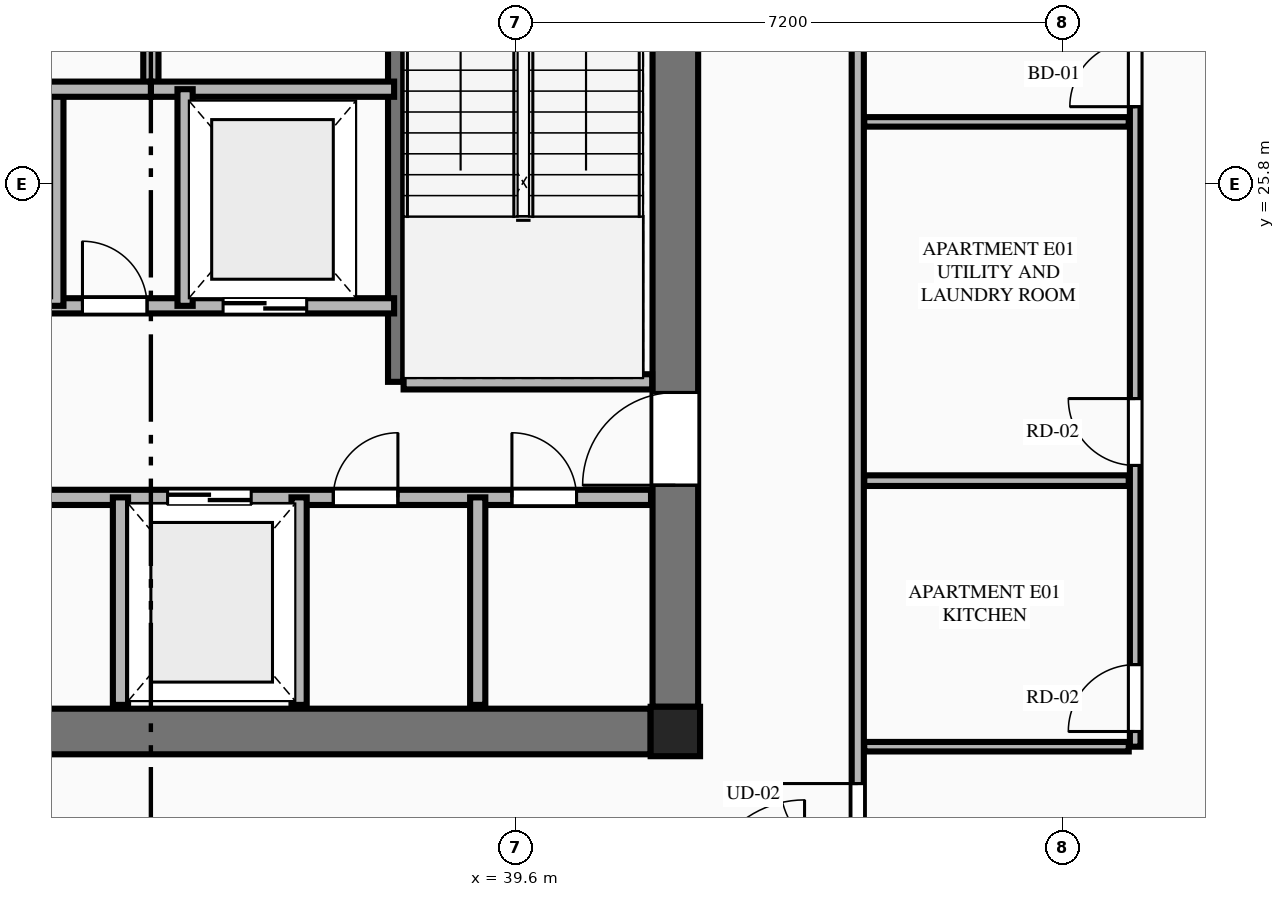
"""IFC4 building model, lengths in metres.
Left out: names, types, materials, properties, quantities, classifications, styles, units other than length and angle.
Written with IfcOpenShell. Run it as: python <this file> out.ifc"""

import sys

from ifc_helpers import new_model, si_unit, direction, frame, frame_2d, origin, origin_2d, place, context, subcontext, project, spatial, rectangle, extrude, element, fill, save


model = new_model("IFC4")
c1 = context("Model", 3, precision=1e-05, world=origin(), true_north=direction((0.0, 1.0)))
c2 = subcontext(c1, "Body", "Model", "MODEL_VIEW")
j1 = project(units=[si_unit("LENGTHUNIT", "METRE"), si_unit("PLANEANGLEUNIT", "RADIAN")], contexts=[c1])
p1 = place(None, origin())
s1 = spatial("IfcSite", under=j1, at=p1, CompositionType="ELEMENT")
p2 = place(p1, origin())
s2 = spatial("IfcBuilding", under=s1, at=p2, CompositionType="ELEMENT")
p3 = place(p2, frame((0.0, 0.0, 167.7)))
s3 = spatial("IfcBuildingStorey", under=s2, at=p3, CompositionType="ELEMENT", Elevation=167.7)
p4 = place(p3, frame((41.7, 18.6, 0.0), z_axis=(0.0, 0.0, 1.0), x_axis=(1.0, 0.0, 0.0)))
e1 = element("IfcColumn", 1, at=p4, inside=s3, PredefinedType="COLUMN", context=c2, shape_type="SweptSolid", body=[
    extrude(rectangle(XDim=0.65, YDim=0.65, at=origin_2d()), origin(), (0.0, 0.0, 1.0), 4.2),
])
p5 = place(p3, frame((23.425, 18.6, 0.0), z_axis=(0.0, 0.0, 1.0), x_axis=(1.0, 0.0, 0.0)))
e2 = element("IfcWall", 2, at=p5, inside=s3, PredefinedType="SHEAR", context=c2, shape_type="SweptSolid", body=[
    extrude(rectangle(XDim=17.95, YDim=0.6, at=frame_2d((8.975, 0.0))), origin(), (0.0, 0.0, 1.0), 4.0),
])
p6 = place(p3, frame((41.7, 18.925, 0.0), z_axis=(0.0, 0.0, 1.0), x_axis=(0.0, 1.0, 0.0)))
e3 = element("IfcWall", 3, at=p6, inside=s3, PredefinedType="SHEAR", context=c2, shape_type="SweptSolid", body=[
    extrude(rectangle(XDim=13.95, YDim=0.6, at=frame_2d((6.975, 0.0))), origin(), (0.0, 0.0, 1.0), 4.0),
])
p7 = place(p6, frame((2.915, 0.0, 0.0)))
e4 = element("IfcOpeningElement", 4, at=p7, cuts=e3, PredefinedType="OPENING", context=c2, shape_type="SweptSolid", body=[
    extrude(rectangle(XDim=1.22, YDim=2.25, at=frame_2d((0.61, 1.125))), frame((0.0, 0.31, 0.0), z_axis=(0.0, -1.0, 0.0), x_axis=(1.0, 0.0, 0.0)), (0.0, 0.0, 1.0), 0.62),
])
p8 = place(p3, frame((38.02, 23.2, 0.0), z_axis=(0.0, 0.0, 1.0), x_axis=(0.0, 1.0, 0.0)))
e5 = element("IfcWall", 5, at=p8, inside=s3, PredefinedType="SHEAR", context=c2, shape_type="SweptSolid", body=[
    extrude(rectangle(XDim=6.78, YDim=0.2, at=frame_2d((3.39, 0.0))), origin(), (0.0, 0.0, 1.0), 4.2),
])
p9 = place(p8, frame((5.32, 0.0, 0.0)))
e6 = element("IfcOpeningElement", 6, at=p9, cuts=e5, PredefinedType="OPENING", context=c2, shape_type="SweptSolid", body=[
    extrude(rectangle(XDim=1.05, YDim=2.15, at=frame_2d((0.525, 1.075))), frame((0.0, 0.11, 0.0), z_axis=(0.0, -1.0, 0.0), x_axis=(1.0, 0.0, 0.0)), (0.0, 0.0, 1.0), 0.22),
])
p10 = place(p3, frame((38.125, 23.2, 0.0), z_axis=(0.0, 0.0, 1.0), x_axis=(1.0, 0.0, 0.0)))
e7 = element("IfcWall", 7, at=p10, inside=s3, PredefinedType="PLUMBINGWALL", context=c2, shape_type="SweptSolid", body=[
    extrude(rectangle(XDim=3.27, YDim=0.2, at=frame_2d((1.635, 0.0))), origin(), (0.0, 0.0, 1.0), 4.0),
])
p11 = place(p3, frame((34.8, 27.05, 0.0), z_axis=(0.0, 0.0, 1.0), x_axis=(0.0, 1.0, 0.0)))
e8 = element("IfcWall", 8, at=p11, inside=s3, PredefinedType="PLUMBINGWALL", context=c2, shape_type="SweptSolid", body=[
    extrude(rectangle(XDim=2.75, YDim=0.2, at=frame_2d((1.375, 0.0))), origin(), (0.0, 0.0, 1.0), 4.0),
])
p12 = place(p11, frame((0.85, 0.0, 0.0)))
e9 = element("IfcOpeningElement", 9, at=p12, cuts=e8, PredefinedType="OPENING", context=c2, shape_type="SweptSolid", body=[
    extrude(rectangle(XDim=1.0, YDim=2.15, at=frame_2d((0.5, 1.075))), frame((0.0, 0.11, 0.0), z_axis=(0.0, -1.0, 0.0), x_axis=(1.0, 0.0, 0.0)), (0.0, 0.0, 1.0), 0.22),
])
p13 = place(p3, frame((34.8, 27.05, 0.0), z_axis=(0.0, 0.0, 1.0), x_axis=(1.0, 0.0, 0.0)))
e10 = element("IfcWall", 10, at=p13, inside=s3, PredefinedType="PLUMBINGWALL", context=c2, shape_type="SweptSolid", body=[
    extrude(rectangle(XDim=3.2, YDim=0.2, at=frame_2d((1.6, 0.0))), origin(), (0.0, 0.0, 1.0), 4.0),
])
p14 = place(p3, frame((31.2, 24.2, 0.0), z_axis=(0.0, 0.0, 1.0), x_axis=(1.0, 0.0, 0.0)))
e11 = element("IfcWall", 11, at=p14, inside=s3, PredefinedType="PLUMBINGWALL", context=c2, shape_type="SweptSolid", body=[
    extrude(rectangle(XDim=6.8, YDim=0.2, at=frame_2d((3.4, 0.0))), origin(), (0.0, 0.0, 1.0), 4.0),
])
p15 = place(p14, frame((0.65, 0.0, 0.0)))
e12 = element("IfcOpeningElement", 12, at=p15, cuts=e11, PredefinedType="OPENING", context=c2, shape_type="SweptSolid", body=[
    extrude(rectangle(XDim=1.1, YDim=2.2, at=frame_2d((0.55, 1.1))), frame((0.0, 0.11, 0.0), z_axis=(0.0, -1.0, 0.0), x_axis=(1.0, 0.0, 0.0)), (0.0, 0.0, 1.0), 0.22),
])
p16 = place(p14, frame((2.7, 0.0, 0.0)))
e13 = element("IfcOpeningElement", 13, at=p16, cuts=e11, PredefinedType="OPENING", context=c2, shape_type="SweptSolid", body=[
    extrude(rectangle(XDim=0.85, YDim=2.05, at=frame_2d((0.425, 1.025))), frame((0.0, 0.11, 0.0), z_axis=(0.0, -1.0, 0.0), x_axis=(1.0, 0.0, 0.0)), (0.0, 0.0, 1.0), 0.22),
])
p17 = place(p14, frame((4.55, 0.0, 0.0)))
e14 = element("IfcOpeningElement", 14, at=p17, cuts=e11, PredefinedType="OPENING", context=c2, shape_type="SweptSolid", body=[
    extrude(rectangle(XDim=1.1, YDim=2.2, at=frame_2d((0.55, 1.1))), frame((0.0, 0.11, 0.0), z_axis=(0.0, -1.0, 0.0), x_axis=(1.0, 0.0, 0.0)), (0.0, 0.0, 1.0), 0.22),
])
for number, where, z_axis, x_axis in (
    (15, (33.55, 24.2, 0.0), (0.0, 0.0, 1.0), (0.0, 1.0, 0.0)),
    (16, (35.25, 24.2, 0.0), (0.0, 0.0, 1.0), (0.0, 1.0, 0.0)),
):
    element("IfcWall", number, at=place(p3, frame(where, z_axis=z_axis, x_axis=x_axis)), inside=s3, PredefinedType="PLUMBINGWALL", context=c2, shape_type="SweptSolid", body=[
        extrude(rectangle(XDim=2.85, YDim=0.2, at=frame_2d((1.425, 0.0))), origin(), (0.0, 0.0, 1.0), 4.0),
    ])
p18 = place(p3, frame((31.25, 27.05, 0.0), z_axis=(0.0, 0.0, 1.0), x_axis=(1.0, 0.0, 0.0)))
e17 = element("IfcWall", 17, at=p18, inside=s3, PredefinedType="PLUMBINGWALL", context=c2, shape_type="SweptSolid", body=[
    extrude(rectangle(XDim=3.55, YDim=0.2, at=frame_2d((1.775, 0.0))), origin(), (0.0, 0.0, 1.0), 4.0),
])
p19 = place(p3, frame((23.42, 21.68, 0.0), z_axis=(0.0, 0.0, 1.0), x_axis=(1.0, 0.0, 0.0)))
e18 = element("IfcWall", 18, at=p19, inside=s3, PredefinedType="PLUMBINGWALL", context=c2, shape_type="SweptSolid", body=[
    extrude(rectangle(XDim=17.96, YDim=0.2, at=frame_2d((8.98, 0.0))), origin(), (0.0, 0.0, 1.0), 4.0),
])
p20 = place(p19, frame((11.6, 0.0, 0.0)))
e19 = element("IfcOpeningElement", 19, at=p20, cuts=e18, PredefinedType="OPENING", context=c2, shape_type="SweptSolid", body=[
    extrude(rectangle(XDim=1.1, YDim=2.2, at=frame_2d((0.55, 1.1))), frame((0.0, 0.11, 0.0), z_axis=(0.0, -1.0, 0.0), x_axis=(1.0, 0.0, 0.0)), (0.0, 0.0, 1.0), 0.22),
])
p21 = place(p19, frame((0.41, 0.0, 0.0)))
e20 = element("IfcOpeningElement", 20, at=p21, cuts=e18, PredefinedType="OPENING", context=c2, shape_type="SweptSolid", body=[
    extrude(rectangle(XDim=0.85, YDim=2.05, at=frame_2d((0.425, 1.025))), frame((0.0, 0.11, 0.0), z_axis=(0.0, -1.0, 0.0), x_axis=(1.0, 0.0, 0.0)), (0.0, 0.0, 1.0), 0.22),
])
p22 = place(p19, frame((13.78, 0.0, 0.0)))
e21 = element("IfcOpeningElement", 21, at=p22, cuts=e18, PredefinedType="OPENING", context=c2, shape_type="SweptSolid", body=[
    extrude(rectangle(XDim=0.85, YDim=2.05, at=frame_2d((0.425, 1.025))), frame((0.0, 0.11, 0.0), z_axis=(0.0, -1.0, 0.0), x_axis=(1.0, 0.0, 0.0)), (0.0, 0.0, 1.0), 0.22),
])
p23 = place(p19, frame((16.13, 0.0, 0.0)))
e22 = element("IfcOpeningElement", 22, at=p23, cuts=e18, PredefinedType="OPENING", context=c2, shape_type="SweptSolid", body=[
    extrude(rectangle(XDim=0.85, YDim=2.05, at=frame_2d((0.425, 1.025))), frame((0.0, 0.11, 0.0), z_axis=(0.0, -1.0, 0.0), x_axis=(1.0, 0.0, 0.0)), (0.0, 0.0, 1.0), 0.22),
])
for number, where, z_axis, x_axis in (
    (23, (34.4, 18.95, 0.0), (0.0, 0.0, 1.0), (0.0, 1.0, 0.0)),
    (24, (36.75, 18.95, 0.0), (0.0, 0.0, 1.0), (0.0, 1.0, 0.0)),
    (25, (39.1, 18.95, 0.0), (0.0, 0.0, 1.0), (0.0, 1.0, 0.0)),
):
    element("IfcWall", number, at=place(p3, frame(where, z_axis=z_axis, x_axis=x_axis)), inside=s3, PredefinedType="PLUMBINGWALL", context=c2, shape_type="SweptSolid", body=[
        extrude(rectangle(XDim=2.73, YDim=0.2, at=frame_2d((1.365, 0.0))), origin(), (0.0, 0.0, 1.0), 4.0),
    ])
p24 = place(p3, frame((44.1, 16.445, 0.0), z_axis=(0.0, 0.0, 1.0), x_axis=(0.0, 1.0, 0.0)))
e26 = element("IfcWall", 26, at=p24, inside=s3, PredefinedType="PARTITIONING", context=c2, shape_type="SweptSolid", body=[
    extrude(rectangle(XDim=19.06, YDim=0.16, at=frame_2d((9.53, 0.0))), origin(), (0.0, 0.0, 1.0), 4.0),
])
p25 = place(p24, frame((0.45, 0.0, 0.0)))
e27 = element("IfcOpeningElement", 27, at=p25, cuts=e26, PredefinedType="OPENING", context=c2, shape_type="SweptSolid", body=[
    extrude(rectangle(XDim=1.02, YDim=2.25, at=frame_2d((0.51, 1.125))), frame((0.0, 0.09, 0.0), z_axis=(0.0, -1.0, 0.0), x_axis=(1.0, 0.0, 0.0)), (0.0, 0.0, 1.0), 0.18),
])
p26 = place(p3, frame((44.185, 18.4, 0.0), z_axis=(0.0, 0.0, 1.0), x_axis=(1.0, 0.0, 0.0)))
e28 = element("IfcWall", 28, at=p26, inside=s3, PredefinedType="PARTITIONING", context=c2, shape_type="SweptSolid", body=[
    extrude(rectangle(XDim=3.48, YDim=0.125, at=frame_2d((1.74, 0.0))), origin(), (0.0, 0.0, 1.0), 2.59),
])
p27 = place(p3, frame((47.75, 18.4, 0.0), z_axis=(0.0, 0.0, 1.0), x_axis=(0.0, 1.0, 0.0)))
e29 = element("IfcWall", 29, at=p27, inside=s3, PredefinedType="PLUMBINGWALL", context=c2, shape_type="SweptSolid", body=[
    extrude(rectangle(XDim=11.62, YDim=0.14, at=frame_2d((5.81, 0.0))), origin(), (0.0, 0.0, 1.0), 4.0),
])
p28 = place(p27, frame((0.2, 0.0, 0.0)))
e30 = element("IfcOpeningElement", 30, at=p28, cuts=e29, PredefinedType="OPENING", context=c2, shape_type="SweptSolid", body=[
    extrude(rectangle(XDim=0.88, YDim=2.15, at=frame_2d((0.44, 1.075))), frame((0.0, 0.08, 0.0), z_axis=(0.0, -1.0, 0.0), x_axis=(1.0, 0.0, 0.0)), (0.0, 0.0, 1.0), 0.16),
])
p29 = place(p27, frame((3.7, 0.0, 0.0)))
e31 = element("IfcOpeningElement", 31, at=p29, cuts=e29, PredefinedType="OPENING", context=c2, shape_type="SweptSolid", body=[
    extrude(rectangle(XDim=0.88, YDim=2.15, at=frame_2d((0.44, 1.075))), frame((0.0, 0.08, 0.0), z_axis=(0.0, -1.0, 0.0), x_axis=(1.0, 0.0, 0.0)), (0.0, 0.0, 1.0), 0.16),
])
p30 = place(p27, frame((8.42, 0.0, 0.0)))
e32 = element("IfcOpeningElement", 32, at=p30, cuts=e29, PredefinedType="OPENING", context=c2, shape_type="SweptSolid", body=[
    extrude(rectangle(XDim=0.86, YDim=2.1, at=frame_2d((0.43, 1.05))), frame((0.0, 0.08, 0.0), z_axis=(0.0, -1.0, 0.0), x_axis=(1.0, 0.0, 0.0)), (0.0, 0.0, 1.0), 0.16),
])
p31 = place(p3, frame((44.185, 21.9, 0.0), z_axis=(0.0, 0.0, 1.0), x_axis=(1.0, 0.0, 0.0)))
e33 = element("IfcWall", 33, at=p31, inside=s3, PredefinedType="PLUMBINGWALL", context=c2, shape_type="SweptSolid", body=[
    extrude(rectangle(XDim=3.48, YDim=0.14, at=frame_2d((1.74, 0.0))), origin(), (0.0, 0.0, 1.0), 4.0),
])
p32 = place(p3, frame((44.185, 26.62, 0.0), z_axis=(0.0, 0.0, 1.0), x_axis=(1.0, 0.0, 0.0)))
e34 = element("IfcWall", 34, at=p32, inside=s3, PredefinedType="PARTITIONING", context=c2, shape_type="SweptSolid", body=[
    extrude(rectangle(XDim=3.48, YDim=0.125, at=frame_2d((1.74, 0.0))), origin(), (0.0, 0.0, 1.0), 4.0),
])
p33 = place(p7, origin())
e35 = element("IfcDoor", 35, at=p33, inside=s3, OperationType="SINGLE_SWING_LEFT", PredefinedType="DOOR", context=c2, shape_type="SweptSolid", body=[
    extrude(rectangle(XDim=1.22, YDim=2.25, at=frame_2d((0.61, 1.125))), frame((0.0, 0.025, 0.0), z_axis=(0.0, -1.0, 0.0), x_axis=(1.0, 0.0, 0.0)), (0.0, 0.0, 1.0), 0.05),
])
fill(e4, e35)
p34 = place(p16, origin())
e36 = element("IfcDoor", 36, at=p34, inside=s3, OperationType="SINGLE_SWING_LEFT", PredefinedType="DOOR", context=c2, shape_type="SweptSolid", body=[
    extrude(rectangle(XDim=0.85, YDim=2.05, at=frame_2d((0.425, 1.025))), frame((0.0, 0.025, 0.0), z_axis=(0.0, -1.0, 0.0), x_axis=(1.0, 0.0, 0.0)), (0.0, 0.0, 1.0), 0.05),
])
fill(e13, e36)
p35 = place(p17, origin())
e37 = element("IfcDoor", 37, at=p35, inside=s3, OperationType="DOUBLE_DOOR_SLIDING", PredefinedType="DOOR", context=c2, shape_type="SweptSolid", body=[
    extrude(rectangle(XDim=1.1, YDim=2.2, at=frame_2d((0.55, 1.1))), frame((0.0, 0.025, 0.0), z_axis=(0.0, -1.0, 0.0), x_axis=(1.0, 0.0, 0.0)), (0.0, 0.0, 1.0), 0.05),
])
fill(e14, e37)
p36 = place(p20, origin())
e38 = element("IfcDoor", 38, at=p36, inside=s3, OperationType="DOUBLE_DOOR_SLIDING", PredefinedType="DOOR", context=c2, shape_type="SweptSolid", body=[
    extrude(rectangle(XDim=1.1, YDim=2.2, at=frame_2d((0.55, 1.1))), frame((0.0, 0.025, 0.0), z_axis=(0.0, -1.0, 0.0), x_axis=(1.0, 0.0, 0.0)), (0.0, 0.0, 1.0), 0.05),
])
fill(e19, e38)
p37 = place(p22, origin())
e39 = element("IfcDoor", 39, at=p37, inside=s3, OperationType="SINGLE_SWING_RIGHT", PredefinedType="DOOR", context=c2, shape_type="SweptSolid", body=[
    extrude(rectangle(XDim=0.85, YDim=2.05, at=frame_2d((0.425, 1.025))), frame((0.0, 0.025, 0.0), z_axis=(0.0, -1.0, 0.0), x_axis=(1.0, 0.0, 0.0)), (0.0, 0.0, 1.0), 0.05),
])
fill(e21, e39)
p38 = place(p23, origin())
e40 = element("IfcDoor", 40, at=p38, inside=s3, OperationType="SINGLE_SWING_LEFT", PredefinedType="DOOR", context=c2, shape_type="SweptSolid", body=[
    extrude(rectangle(XDim=0.85, YDim=2.05, at=frame_2d((0.425, 1.025))), frame((0.0, 0.025, 0.0), z_axis=(0.0, -1.0, 0.0), x_axis=(1.0, 0.0, 0.0)), (0.0, 0.0, 1.0), 0.05),
])
fill(e22, e40)
p39 = place(p28, origin())
e41 = element("IfcDoor", 41, at=p39, inside=s3, OperationType="SINGLE_SWING_LEFT", PredefinedType="DOOR", context=c2, shape_type="SweptSolid", body=[
    extrude(rectangle(XDim=0.88, YDim=2.15, at=frame_2d((0.44, 1.075))), frame((0.0, 0.025, 0.0), z_axis=(0.0, -1.0, 0.0), x_axis=(1.0, 0.0, 0.0)), (0.0, 0.0, 1.0), 0.05),
])
fill(e30, e41)
p40 = place(p29, origin())
e42 = element("IfcDoor", 42, at=p40, inside=s3, OperationType="SINGLE_SWING_RIGHT", PredefinedType="DOOR", context=c2, shape_type="SweptSolid", body=[
    extrude(rectangle(XDim=0.88, YDim=2.15, at=frame_2d((0.44, 1.075))), frame((0.0, 0.025, 0.0), z_axis=(0.0, -1.0, 0.0), x_axis=(1.0, 0.0, 0.0)), (0.0, 0.0, 1.0), 0.05),
])
fill(e31, e42)
p41 = place(p30, origin())
e43 = element("IfcDoor", 43, at=p41, inside=s3, OperationType="SINGLE_SWING_LEFT", PredefinedType="DOOR", context=c2, shape_type="SweptSolid", body=[
    extrude(rectangle(XDim=0.86, YDim=2.1, at=frame_2d((0.43, 1.05))), frame((0.0, 0.025, 0.0), z_axis=(0.0, -1.0, 0.0), x_axis=(1.0, 0.0, 0.0)), (0.0, 0.0, 1.0), 0.05),
])
fill(e32, e43)
p42 = place(p25, origin())
e44 = element("IfcDoor", 44, at=p42, inside=s3, OperationType="SINGLE_SWING_RIGHT", PredefinedType="DOOR", context=c2, shape_type="SweptSolid", body=[
    extrude(rectangle(XDim=1.02, YDim=2.25, at=frame_2d((0.51, 1.125))), frame((0.0, 0.025, 0.0), z_axis=(0.0, -1.0, 0.0), x_axis=(1.0, 0.0, 0.0)), (0.0, 0.0, 1.0), 0.05),
])
fill(e27, e44)
save(model, sys.argv[1])
